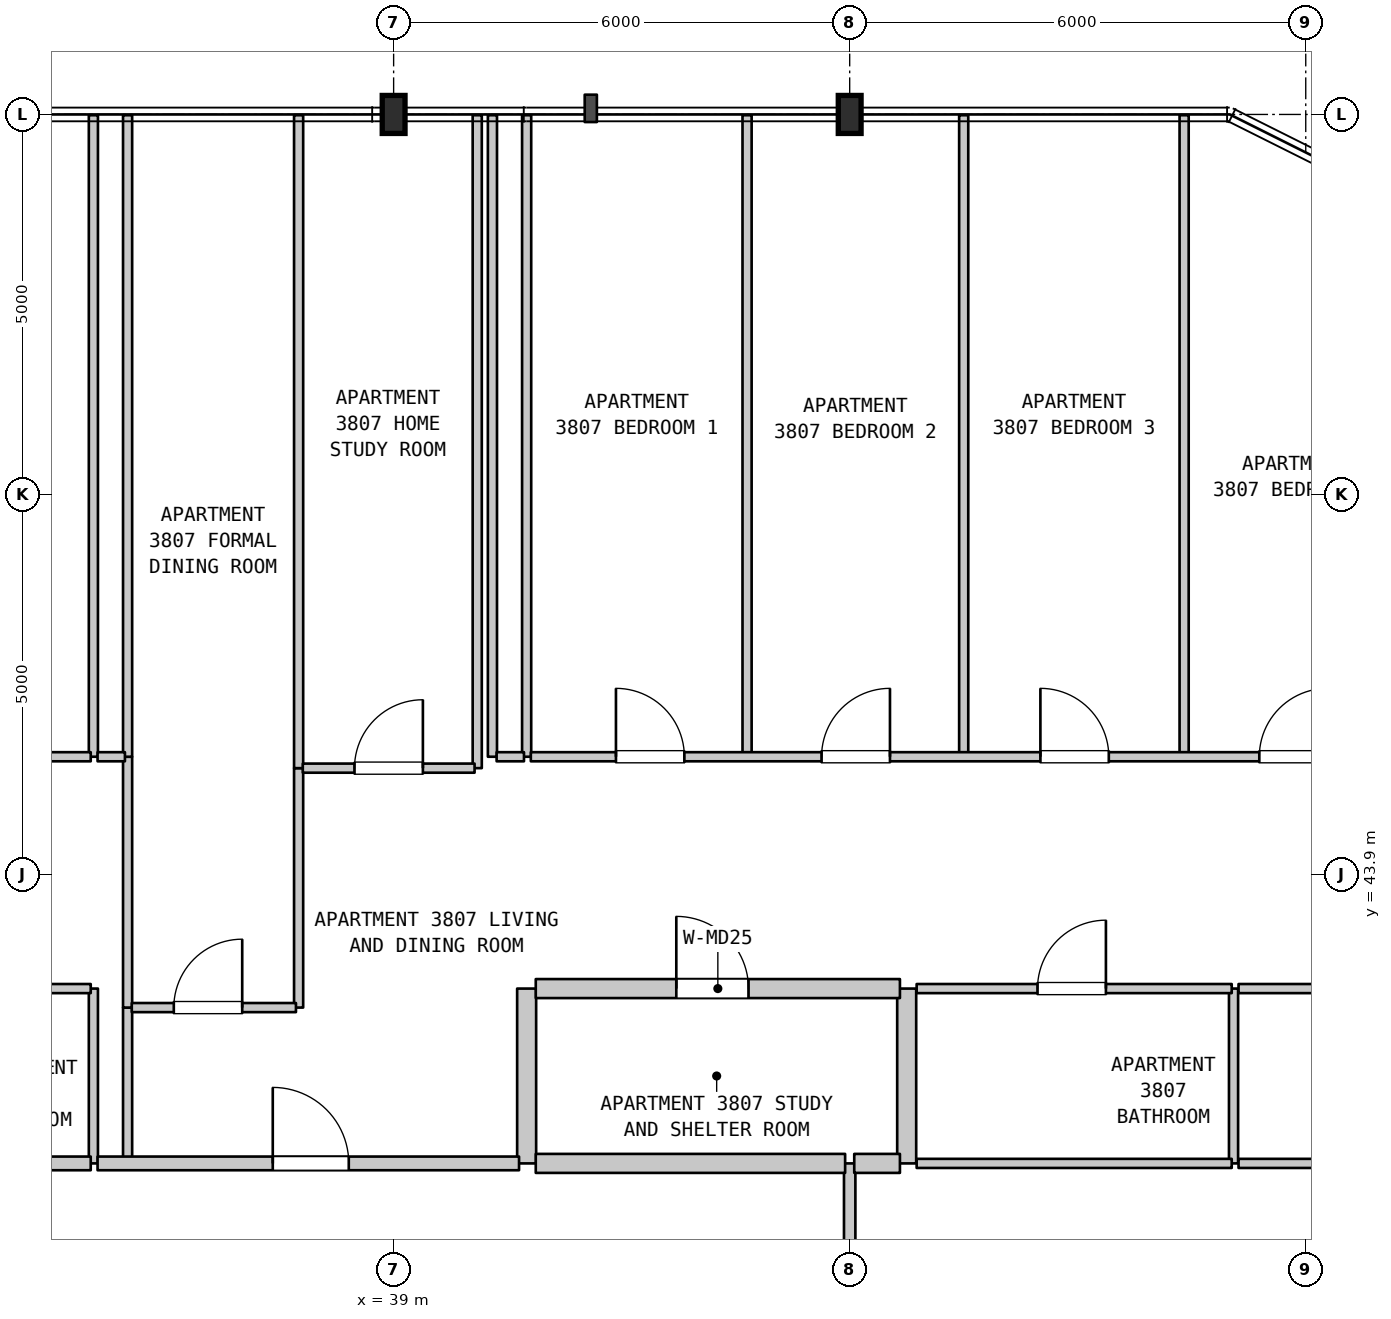
"""IFC4 building model, lengths in metres.
Left out: names, types, materials, properties, quantities, classifications, styles, units other than length and angle.
Written with IfcOpenShell. Run it as: python <this file> out.ifc"""

import sys

from ifc_helpers import new_model, si_unit, direction, frame, frame_2d, origin, origin_2d, place, context, subcontext, project, spatial, rectangle, i_section, extrude, element, fill, save


model = new_model("IFC4")
c1 = context("Model", 3, precision=1e-05, world=origin(), true_north=direction((0.0, 1.0)))
c2 = subcontext(c1, "Body", "Model", "MODEL_VIEW")
j1 = project(units=[si_unit("LENGTHUNIT", "METRE"), si_unit("PLANEANGLEUNIT", "RADIAN")], contexts=[c1])
p1 = place(None, origin())
s1 = spatial("IfcSite", under=j1, at=p1, CompositionType="ELEMENT")
p2 = place(p1, origin())
s2 = spatial("IfcBuilding", under=s1, at=p2, CompositionType="ELEMENT")
p3 = place(p2, frame((0.0, 0.0, 155.7)))
s3 = spatial("IfcBuildingStorey", under=s2, at=p3, CompositionType="ELEMENT", Elevation=155.7)
for number, where, z_axis, x_axis in (
    (1, (39.0, 53.9, 0.0), (0.0, 0.0, 1.0), (1.0, 0.0, 0.0)),
    (2, (45.0, 53.9, 0.0), (0.0, 0.0, 1.0), (1.0, 0.0, 0.0)),
):
    element("IfcColumn", number, at=place(p3, frame(where, z_axis=z_axis, x_axis=x_axis)), inside=s3, PredefinedType="COLUMN", context=c2, shape_type="SweptSolid", body=[
        extrude(i_section(OverallWidth=0.3, OverallDepth=0.5, WebThickness=0.014, FlangeThickness=0.028, FilletRadius=0.027, at=origin_2d()), origin(), (0.0, 0.0, 1.0), 3.7),
    ])
p4 = place(p3, frame((35.05, 40.1, 0.0), z_axis=(0.0, 0.0, 1.0), x_axis=(0.0, 1.0, 0.0)))
e3 = element("IfcWall", 3, at=p4, inside=s3, PredefinedType="PARTITIONING", context=c2, shape_type="SweptSolid", body=[
    extrude(rectangle(XDim=2.3, YDim=0.12, at=frame_2d((1.15, 0.0))), origin(), (0.0, 0.0, 1.0), 3.28),
])
p5 = place(p3, frame((35.05, 45.45, 0.0), z_axis=(0.0, 0.0, 1.0), x_axis=(0.0, 1.0, 0.0)))
e4 = element("IfcWall", 4, at=p5, inside=s3, PredefinedType="PARTITIONING", context=c2, shape_type="SweptSolid", body=[
    extrude(rectangle(XDim=8.44, YDim=0.12, at=frame_2d((4.22, 0.0))), origin(), (0.0, 0.0, 1.0), 3.28),
])
p6 = place(p3, frame((35.5, 40.1, 0.0), z_axis=(0.0, 0.0, 1.0), x_axis=(0.0, 1.0, 0.0)))
e5 = element("IfcWall", 5, at=p6, inside=s3, PredefinedType="PARTITIONING", context=c2, shape_type="SweptSolid", body=[
    extrude(rectangle(XDim=2.05, YDim=0.12, at=frame_2d((1.025, 0.0))), origin(), (0.0, 0.0, 1.0), 3.28),
])
p7 = place(p3, frame((35.5, 42.15, 0.0), z_axis=(0.0, 0.0, 1.0), x_axis=(0.0, 1.0, 0.0)))
e6 = element("IfcWall", 6, at=p7, inside=s3, PredefinedType="PARTITIONING", context=c2, shape_type="SweptSolid", body=[
    extrude(rectangle(XDim=3.3, YDim=0.12, at=frame_2d((1.65, 0.0))), origin(), (0.0, 0.0, 1.0), 3.28),
])
p8 = place(p3, frame((35.5, 45.45, 0.0), z_axis=(0.0, 0.0, 1.0), x_axis=(0.0, 1.0, 0.0)))
e7 = element("IfcWall", 7, at=p8, inside=s3, PredefinedType="PARTITIONING", context=c2, shape_type="SweptSolid", body=[
    extrude(rectangle(XDim=8.44, YDim=0.12, at=frame_2d((4.22, 0.0))), origin(), (0.0, 0.0, 1.0), 3.28),
])
p9 = place(p3, frame((37.75, 42.15, 0.0), z_axis=(0.0, 0.0, 1.0), x_axis=(0.0, 1.0, 0.0)))
e8 = element("IfcWall", 8, at=p9, inside=s3, PredefinedType="PARTITIONING", context=c2, shape_type="SweptSolid", body=[
    extrude(rectangle(XDim=3.15, YDim=0.12, at=frame_2d((1.575, 0.0))), origin(), (0.0, 0.0, 1.0), 3.28),
])
for number, where, z_axis, x_axis in (
    (9, (37.75, 45.3, 0.0), (0.0, 0.0, 1.0), (0.0, 1.0, 0.0)),
    (10, (40.1, 45.3, 0.0), (0.0, 0.0, 1.0), (0.0, 1.0, 0.0)),
):
    element("IfcWall", number, at=place(p3, frame(where, z_axis=z_axis, x_axis=x_axis)), inside=s3, PredefinedType="PARTITIONING", context=c2, shape_type="SweptSolid", body=[
        extrude(rectangle(XDim=8.59, YDim=0.12, at=frame_2d((4.295, 0.0))), origin(), (0.0, 0.0, 1.0), 3.28),
    ])
p10 = place(p3, frame((40.3, 45.45, 0.0), z_axis=(0.0, 0.0, 1.0), x_axis=(0.0, 1.0, 0.0)))
e11 = element("IfcWall", 11, at=p10, inside=s3, PredefinedType="PARTITIONING", context=c2, shape_type="SweptSolid", body=[
    extrude(rectangle(XDim=8.44, YDim=0.12, at=frame_2d((4.22, 0.0))), origin(), (0.0, 0.0, 1.0), 3.28),
])
p11 = place(p3, frame((40.75, 40.1, 0.0), z_axis=(0.0, 0.0, 1.0), x_axis=(0.0, 1.0, 0.0)))
e12 = element("IfcWall", 12, at=p11, inside=s3, PredefinedType="STANDARD", context=c2, shape_type="SweptSolid", body=[
    extrude(rectangle(XDim=2.3, YDim=0.25, at=frame_2d((1.15, 0.0))), origin(), (0.0, 0.0, 1.0), 3.28),
])
for number, where, z_axis, x_axis in (
    (13, (40.75, 45.45, 0.0), (0.0, 0.0, 1.0), (0.0, 1.0, 0.0)),
    (14, (43.65, 45.45, 0.0), (0.0, 0.0, 1.0), (0.0, 1.0, 0.0)),
):
    element("IfcWall", number, at=place(p3, frame(where, z_axis=z_axis, x_axis=x_axis)), inside=s3, PredefinedType="PARTITIONING", context=c2, shape_type="SweptSolid", body=[
        extrude(rectangle(XDim=8.44, YDim=0.12, at=frame_2d((4.22, 0.0))), origin(), (0.0, 0.0, 1.0), 3.28),
    ])
p12 = place(p3, frame((45.0, 37.9, 0.0), z_axis=(0.0, 0.0, 1.0), x_axis=(0.0, 1.0, 0.0)))
e15 = element("IfcWall", 15, at=p12, inside=s3, PredefinedType="STANDARD", context=c2, shape_type="SweptSolid", body=[
    extrude(rectangle(XDim=2.2, YDim=0.15, at=frame_2d((1.1, 0.0))), origin(), (0.0, 0.0, 1.0), 3.28),
])
p13 = place(p3, frame((45.75, 40.1, 0.0), z_axis=(0.0, 0.0, 1.0), x_axis=(0.0, 1.0, 0.0)))
e16 = element("IfcWall", 16, at=p13, inside=s3, PredefinedType="STANDARD", context=c2, shape_type="SweptSolid", body=[
    extrude(rectangle(XDim=2.3, YDim=0.25, at=frame_2d((1.15, 0.0))), origin(), (0.0, 0.0, 1.0), 3.28),
])
for number, where, z_axis, x_axis in (
    (17, (46.5, 45.45, 0.0), (0.0, 0.0, 1.0), (0.0, 1.0, 0.0)),
    (18, (49.4, 45.45, 0.0), (0.0, 0.0, 1.0), (0.0, 1.0, 0.0)),
):
    element("IfcWall", number, at=place(p3, frame(where, z_axis=z_axis, x_axis=x_axis)), inside=s3, PredefinedType="PARTITIONING", context=c2, shape_type="SweptSolid", body=[
        extrude(rectangle(XDim=8.44, YDim=0.12, at=frame_2d((4.22, 0.0))), origin(), (0.0, 0.0, 1.0), 3.28),
    ])
p14 = place(p3, frame((50.05, 40.1, 0.0), z_axis=(0.0, 0.0, 1.0), x_axis=(0.0, 1.0, 0.0)))
e19 = element("IfcWall", 19, at=p14, inside=s3, PredefinedType="PARTITIONING", context=c2, shape_type="SweptSolid", body=[
    extrude(rectangle(XDim=2.3, YDim=0.12, at=frame_2d((1.15, 0.0))), origin(), (0.0, 0.0, 1.0), 3.28),
])
p15 = place(p3, frame((31.525, 40.1, 0.0), z_axis=(0.0, 0.0, 1.0), x_axis=(1.0, 0.0, 0.0)))
e20 = element("IfcWall", 20, at=p15, inside=s3, PredefinedType="STANDARD", context=c2, shape_type="SweptSolid", body=[
    extrude(rectangle(XDim=3.49, YDim=0.18, at=frame_2d((1.745, 0.0))), origin(), (0.0, 0.0, 1.0), 3.28),
])
p16 = place(p3, frame((35.105, 40.1, 0.0), z_axis=(0.0, 0.0, 1.0), x_axis=(1.0, 0.0, 0.0)))
e21 = element("IfcWall", 21, at=p16, inside=s3, PredefinedType="STANDARD", context=c2, shape_type="SweptSolid", body=[
    extrude(rectangle(XDim=5.545, YDim=0.18, at=frame_2d((2.772, 0.0))), origin(), (0.0, 0.0, 1.0), 3.28),
])
p17 = place(p16, frame((2.305, 0.0, 0.0)))
e22 = element("IfcOpeningElement", 22, at=p17, cuts=e21, PredefinedType="OPENING", context=c2, shape_type="SweptSolid", body=[
    extrude(rectangle(XDim=1.0, YDim=2.15, at=frame_2d((0.5, 1.075))), frame((0.0, 0.1, 0.0), z_axis=(0.0, -1.0, 0.0), x_axis=(1.0, 0.0, 0.0)), (0.0, 0.0, 1.0), 0.2),
])
p18 = place(p3, frame((40.87, 40.1, 0.0), z_axis=(0.0, 0.0, 1.0), x_axis=(1.0, 0.0, 0.0)))
e23 = element("IfcWall", 23, at=p18, inside=s3, PredefinedType="STANDARD", context=c2, shape_type="SweptSolid", body=[
    extrude(rectangle(XDim=4.07, YDim=0.25, at=frame_2d((2.035, 0.0))), origin(), (0.0, 0.0, 1.0), 3.28),
])
p19 = place(p3, frame((45.06, 40.1, 0.0), z_axis=(0.0, 0.0, 1.0), x_axis=(1.0, 0.0, 0.0)))
e24 = element("IfcWall", 24, at=p19, inside=s3, PredefinedType="STANDARD", context=c2, shape_type="SweptSolid", body=[
    extrude(rectangle(XDim=0.601, YDim=0.25, at=frame_2d((0.3, 0.0))), origin(), (0.0, 0.0, 1.0), 3.28),
])
p20 = place(p3, frame((45.881, 40.1, 0.0), z_axis=(0.0, 0.0, 1.0), x_axis=(1.0, 0.0, 0.0)))
e25 = element("IfcWall", 25, at=p20, inside=s3, PredefinedType="PARTITIONING", context=c2, shape_type="SweptSolid", body=[
    extrude(rectangle(XDim=4.145, YDim=0.12, at=frame_2d((2.072, 0.0))), origin(), (0.0, 0.0, 1.0), 3.28),
])
p21 = place(p3, frame((50.116, 40.1, 0.0), z_axis=(0.0, 0.0, 1.0), x_axis=(1.0, 0.0, 0.0)))
e26 = element("IfcWall", 26, at=p21, inside=s3, PredefinedType="PARTITIONING", context=c2, shape_type="SweptSolid", body=[
    extrude(rectangle(XDim=7.877, YDim=0.12, at=frame_2d((3.938, 0.0))), origin(), (0.0, 0.0, 1.0), 3.28),
])
p22 = place(p3, frame((35.555, 42.15, 0.0), z_axis=(0.0, 0.0, 1.0), x_axis=(1.0, 0.0, 0.0)))
e27 = element("IfcWall", 27, at=p22, inside=s3, PredefinedType="PARTITIONING", context=c2, shape_type="SweptSolid", body=[
    extrude(rectangle(XDim=2.16, YDim=0.12, at=frame_2d((1.08, 0.0))), origin(), (0.0, 0.0, 1.0), 3.28),
])
p23 = place(p22, frame((0.553, 0.0, 0.0)))
e28 = element("IfcOpeningElement", 28, at=p23, cuts=e27, PredefinedType="OPENING", context=c2, shape_type="SweptSolid", body=[
    extrude(rectangle(XDim=0.9, YDim=2.15, at=frame_2d((0.45, 1.075))), frame((0.0, 0.07, 0.0), z_axis=(0.0, -1.0, 0.0), x_axis=(1.0, 0.0, 0.0)), (0.0, 0.0, 1.0), 0.14),
])
p24 = place(p3, frame((31.525, 42.4, 0.0), z_axis=(0.0, 0.0, 1.0), x_axis=(1.0, 0.0, 0.0)))
e29 = element("IfcWall", 29, at=p24, inside=s3, PredefinedType="PARTITIONING", context=c2, shape_type="SweptSolid", body=[
    extrude(rectangle(XDim=3.49, YDim=0.12, at=frame_2d((1.745, 0.0))), origin(), (0.0, 0.0, 1.0), 3.28),
])
p25 = place(p24, frame((1.223, 0.0, 0.0)))
e30 = element("IfcOpeningElement", 30, at=p25, cuts=e29, PredefinedType="OPENING", context=c2, shape_type="SweptSolid", body=[
    extrude(rectangle(XDim=0.9, YDim=2.1, at=frame_2d((0.45, 1.05))), frame((0.0, 0.07, 0.0), z_axis=(0.0, -1.0, 0.0), x_axis=(1.0, 0.0, 0.0)), (0.0, 0.0, 1.0), 0.14),
])
p26 = place(p3, frame((40.87, 42.4, 0.0), z_axis=(0.0, 0.0, 1.0), x_axis=(1.0, 0.0, 0.0)))
e31 = element("IfcWall", 31, at=p26, inside=s3, PredefinedType="STANDARD", context=c2, shape_type="SweptSolid", body=[
    extrude(rectangle(XDim=4.791, YDim=0.25, at=frame_2d((2.396, 0.0))), origin(), (0.0, 0.0, 1.0), 3.28),
])
p27 = place(p26, frame((1.849, 0.0, 0.0)))
e32 = element("IfcOpeningElement", 32, at=p27, cuts=e31, PredefinedType="OPENING", context=c2, shape_type="SweptSolid", body=[
    extrude(rectangle(XDim=0.95, YDim=2.15, at=frame_2d((0.475, 1.075))), frame((0.0, 0.135, 0.0), z_axis=(0.0, -1.0, 0.0), x_axis=(1.0, 0.0, 0.0)), (0.0, 0.0, 1.0), 0.27),
])
p28 = place(p3, frame((45.881, 42.4, 0.0), z_axis=(0.0, 0.0, 1.0), x_axis=(1.0, 0.0, 0.0)))
e33 = element("IfcWall", 33, at=p28, inside=s3, PredefinedType="PARTITIONING", context=c2, shape_type="SweptSolid", body=[
    extrude(rectangle(XDim=4.145, YDim=0.12, at=frame_2d((2.072, 0.0))), origin(), (0.0, 0.0, 1.0), 3.28),
])
p29 = place(p28, frame((1.59, 0.0, 0.0)))
e34 = element("IfcOpeningElement", 34, at=p29, cuts=e33, PredefinedType="OPENING", context=c2, shape_type="SweptSolid", body=[
    extrude(rectangle(XDim=0.9, YDim=2.1, at=frame_2d((0.45, 1.05))), frame((0.0, 0.07, 0.0), z_axis=(0.0, -1.0, 0.0), x_axis=(1.0, 0.0, 0.0)), (0.0, 0.0, 1.0), 0.14),
])
p30 = place(p3, frame((50.116, 42.4, 0.0), z_axis=(0.0, 0.0, 1.0), x_axis=(1.0, 0.0, 0.0)))
e35 = element("IfcWall", 35, at=p30, inside=s3, PredefinedType="PARTITIONING", context=c2, shape_type="SweptSolid", body=[
    extrude(rectangle(XDim=7.877, YDim=0.12, at=frame_2d((3.938, 0.0))), origin(), (0.0, 0.0, 1.0), 3.28),
])
p31 = place(p30, frame((3.488, 0.0, 0.0)))
e36 = element("IfcOpeningElement", 36, at=p31, cuts=e35, PredefinedType="OPENING", context=c2, shape_type="SweptSolid", body=[
    extrude(rectangle(XDim=0.9, YDim=2.15, at=frame_2d((0.45, 1.075))), frame((0.0, 0.07, 0.0), z_axis=(0.0, -1.0, 0.0), x_axis=(1.0, 0.0, 0.0)), (0.0, 0.0, 1.0), 0.14),
])
p32 = place(p3, frame((37.805, 45.3, 0.0), z_axis=(0.0, 0.0, 1.0), x_axis=(1.0, 0.0, 0.0)))
e37 = element("IfcWall", 37, at=p32, inside=s3, PredefinedType="PARTITIONING", context=c2, shape_type="SweptSolid", body=[
    extrude(rectangle(XDim=2.26, YDim=0.12, at=frame_2d((1.13, 0.0))), origin(), (0.0, 0.0, 1.0), 3.28),
])
p33 = place(p32, frame((0.68, 0.0, 0.0)))
e38 = element("IfcOpeningElement", 38, at=p33, cuts=e37, PredefinedType="OPENING", context=c2, shape_type="SweptSolid", body=[
    extrude(rectangle(XDim=0.9, YDim=2.15, at=frame_2d((0.45, 1.075))), frame((0.0, 0.07, 0.0), z_axis=(0.0, -1.0, 0.0), x_axis=(1.0, 0.0, 0.0)), (0.0, 0.0, 1.0), 0.14),
])
p34 = place(p3, frame((28.475, 45.45, 0.0), z_axis=(0.0, 0.0, 1.0), x_axis=(1.0, 0.0, 0.0)))
e39 = element("IfcWall", 39, at=p34, inside=s3, PredefinedType="PARTITIONING", context=c2, shape_type="SweptSolid", body=[
    extrude(rectangle(XDim=6.54, YDim=0.12, at=frame_2d((3.27, 0.0))), origin(), (0.0, 0.0, 1.0), 3.28),
])
p35 = place(p34, frame((1.266, 0.0, 0.0)))
e40 = element("IfcOpeningElement", 40, at=p35, cuts=e39, PredefinedType="OPENING", context=c2, shape_type="SweptSolid", body=[
    extrude(rectangle(XDim=0.9, YDim=2.15, at=frame_2d((0.45, 1.075))), frame((0.0, 0.07, 0.0), z_axis=(0.0, -1.0, 0.0), x_axis=(1.0, 0.0, 0.0)), (0.0, 0.0, 1.0), 0.14),
])
p36 = place(p34, frame((4.231, 0.0, 0.0)))
e41 = element("IfcOpeningElement", 41, at=p36, cuts=e39, PredefinedType="OPENING", context=c2, shape_type="SweptSolid", body=[
    extrude(rectangle(XDim=0.9, YDim=2.15, at=frame_2d((0.45, 1.075))), frame((0.0, 0.07, 0.0), z_axis=(0.0, -1.0, 0.0), x_axis=(1.0, 0.0, 0.0)), (0.0, 0.0, 1.0), 0.14),
])
for number, where, z_axis, x_axis in (
    (42, (35.105, 45.45, 0.0), (0.0, 0.0, 1.0), (1.0, 0.0, 0.0)),
    (43, (40.355, 45.45, 0.0), (0.0, 0.0, 1.0), (1.0, 0.0, 0.0)),
):
    element("IfcWall", number, at=place(p3, frame(where, z_axis=z_axis, x_axis=x_axis)), inside=s3, PredefinedType="PARTITIONING", context=c2, shape_type="SweptSolid", body=[
        extrude(rectangle(XDim=0.36, YDim=0.12, at=frame_2d((0.18, 0.0))), origin(), (0.0, 0.0, 1.0), 3.28),
    ])
p37 = place(p3, frame((40.805, 45.45, 0.0), z_axis=(0.0, 0.0, 1.0), x_axis=(1.0, 0.0, 0.0)))
e44 = element("IfcWall", 44, at=p37, inside=s3, PredefinedType="PARTITIONING", context=c2, shape_type="SweptSolid", body=[
    extrude(rectangle(XDim=16.523, YDim=0.12, at=frame_2d((8.261, 0.0))), origin(), (0.0, 0.0, 1.0), 3.28),
])
p38 = place(p37, frame((1.12, 0.0, 0.0)))
e45 = element("IfcOpeningElement", 45, at=p38, cuts=e44, PredefinedType="OPENING", context=c2, shape_type="SweptSolid", body=[
    extrude(rectangle(XDim=0.9, YDim=2.15, at=frame_2d((0.45, 1.075))), frame((0.0, 0.07, 0.0), z_axis=(0.0, -1.0, 0.0), x_axis=(1.0, 0.0, 0.0)), (0.0, 0.0, 1.0), 0.14),
])
p39 = place(p37, frame((3.825, 0.0, 0.0)))
e46 = element("IfcOpeningElement", 46, at=p39, cuts=e44, PredefinedType="OPENING", context=c2, shape_type="SweptSolid", body=[
    extrude(rectangle(XDim=0.9, YDim=2.15, at=frame_2d((0.45, 1.075))), frame((0.0, 0.07, 0.0), z_axis=(0.0, -1.0, 0.0), x_axis=(1.0, 0.0, 0.0)), (0.0, 0.0, 1.0), 0.14),
])
p40 = place(p37, frame((6.704, 0.0, 0.0)))
e47 = element("IfcOpeningElement", 47, at=p40, cuts=e44, PredefinedType="OPENING", context=c2, shape_type="SweptSolid", body=[
    extrude(rectangle(XDim=0.9, YDim=2.15, at=frame_2d((0.45, 1.075))), frame((0.0, 0.07, 0.0), z_axis=(0.0, -1.0, 0.0), x_axis=(1.0, 0.0, 0.0)), (0.0, 0.0, 1.0), 0.14),
])
p41 = place(p37, frame((9.584, 0.0, 0.0)))
e48 = element("IfcOpeningElement", 48, at=p41, cuts=e44, PredefinedType="OPENING", context=c2, shape_type="SweptSolid", body=[
    extrude(rectangle(XDim=0.9, YDim=2.15, at=frame_2d((0.45, 1.075))), frame((0.0, 0.07, 0.0), z_axis=(0.0, -1.0, 0.0), x_axis=(1.0, 0.0, 0.0)), (0.0, 0.0, 1.0), 0.14),
])
p42 = place(p37, frame((12.464, 0.0, 0.0)))
e49 = element("IfcOpeningElement", 49, at=p42, cuts=e44, PredefinedType="OPENING", context=c2, shape_type="SweptSolid", body=[
    extrude(rectangle(XDim=0.9, YDim=2.15, at=frame_2d((0.45, 1.075))), frame((0.0, 0.07, 0.0), z_axis=(0.0, -1.0, 0.0), x_axis=(1.0, 0.0, 0.0)), (0.0, 0.0, 1.0), 0.14),
])
p43 = place(p17, origin())
e50 = element("IfcDoor", 50, at=p43, inside=s3, OperationType="SINGLE_SWING_LEFT", PredefinedType="DOOR", context=c2, shape_type="SweptSolid", body=[
    extrude(rectangle(XDim=1.0, YDim=2.15, at=frame_2d((0.5, 1.075))), frame((0.0, 0.025, 0.0), z_axis=(0.0, -1.0, 0.0), x_axis=(1.0, 0.0, 0.0)), (0.0, 0.0, 1.0), 0.05),
])
fill(e22, e50)
p44 = place(p23, origin())
e51 = element("IfcDoor", 51, at=p44, inside=s3, OperationType="SINGLE_SWING_RIGHT", PredefinedType="DOOR", context=c2, shape_type="SweptSolid", body=[
    extrude(rectangle(XDim=0.9, YDim=2.15, at=frame_2d((0.45, 1.075))), frame((0.0, 0.025, 0.0), z_axis=(0.0, -1.0, 0.0), x_axis=(1.0, 0.0, 0.0)), (0.0, 0.0, 1.0), 0.05),
])
fill(e28, e51)
p45 = place(p27, origin())
e52 = element("IfcDoor", 52, at=p45, inside=s3, OperationType="SINGLE_SWING_LEFT", PredefinedType="DOOR", context=c2, shape_type="SweptSolid", body=[
    extrude(rectangle(XDim=0.95, YDim=2.15, at=frame_2d((0.475, 1.075))), frame((0.0, 0.025, 0.0), z_axis=(0.0, -1.0, 0.0), x_axis=(1.0, 0.0, 0.0)), (0.0, 0.0, 1.0), 0.05),
])
fill(e32, e52)
p46 = place(p29, origin())
e53 = element("IfcDoor", 53, at=p46, inside=s3, OperationType="SINGLE_SWING_RIGHT", PredefinedType="DOOR", context=c2, shape_type="SweptSolid", body=[
    extrude(rectangle(XDim=0.9, YDim=2.1, at=frame_2d((0.45, 1.05))), frame((0.0, 0.025, 0.0), z_axis=(0.0, -1.0, 0.0), x_axis=(1.0, 0.0, 0.0)), (0.0, 0.0, 1.0), 0.05),
])
fill(e34, e53)
p47 = place(p33, origin())
e54 = element("IfcDoor", 54, at=p47, inside=s3, OperationType="SINGLE_SWING_RIGHT", PredefinedType="DOOR", context=c2, shape_type="SweptSolid", body=[
    extrude(rectangle(XDim=0.9, YDim=2.15, at=frame_2d((0.45, 1.075))), frame((0.0, 0.025, 0.0), z_axis=(0.0, -1.0, 0.0), x_axis=(1.0, 0.0, 0.0)), (0.0, 0.0, 1.0), 0.05),
])
fill(e38, e54)
p48 = place(p38, origin())
e55 = element("IfcDoor", 55, at=p48, inside=s3, OperationType="SINGLE_SWING_LEFT", PredefinedType="DOOR", context=c2, shape_type="SweptSolid", body=[
    extrude(rectangle(XDim=0.9, YDim=2.15, at=frame_2d((0.45, 1.075))), frame((0.0, 0.025, 0.0), z_axis=(0.0, -1.0, 0.0), x_axis=(1.0, 0.0, 0.0)), (0.0, 0.0, 1.0), 0.05),
])
fill(e45, e55)
p49 = place(p39, origin())
e56 = element("IfcDoor", 56, at=p49, inside=s3, OperationType="SINGLE_SWING_RIGHT", PredefinedType="DOOR", context=c2, shape_type="SweptSolid", body=[
    extrude(rectangle(XDim=0.9, YDim=2.15, at=frame_2d((0.45, 1.075))), frame((0.0, 0.025, 0.0), z_axis=(0.0, -1.0, 0.0), x_axis=(1.0, 0.0, 0.0)), (0.0, 0.0, 1.0), 0.05),
])
fill(e46, e56)
p50 = place(p40, origin())
e57 = element("IfcDoor", 57, at=p50, inside=s3, OperationType="SINGLE_SWING_LEFT", PredefinedType="DOOR", context=c2, shape_type="SweptSolid", body=[
    extrude(rectangle(XDim=0.9, YDim=2.15, at=frame_2d((0.45, 1.075))), frame((0.0, 0.025, 0.0), z_axis=(0.0, -1.0, 0.0), x_axis=(1.0, 0.0, 0.0)), (0.0, 0.0, 1.0), 0.05),
])
fill(e47, e57)
p51 = place(p41, origin())
e58 = element("IfcDoor", 58, at=p51, inside=s3, OperationType="SINGLE_SWING_RIGHT", PredefinedType="DOOR", context=c2, shape_type="SweptSolid", body=[
    extrude(rectangle(XDim=0.9, YDim=2.15, at=frame_2d((0.45, 1.075))), frame((0.0, 0.025, 0.0), z_axis=(0.0, -1.0, 0.0), x_axis=(1.0, 0.0, 0.0)), (0.0, 0.0, 1.0), 0.05),
])
fill(e48, e58)
save(model, sys.argv[1])
